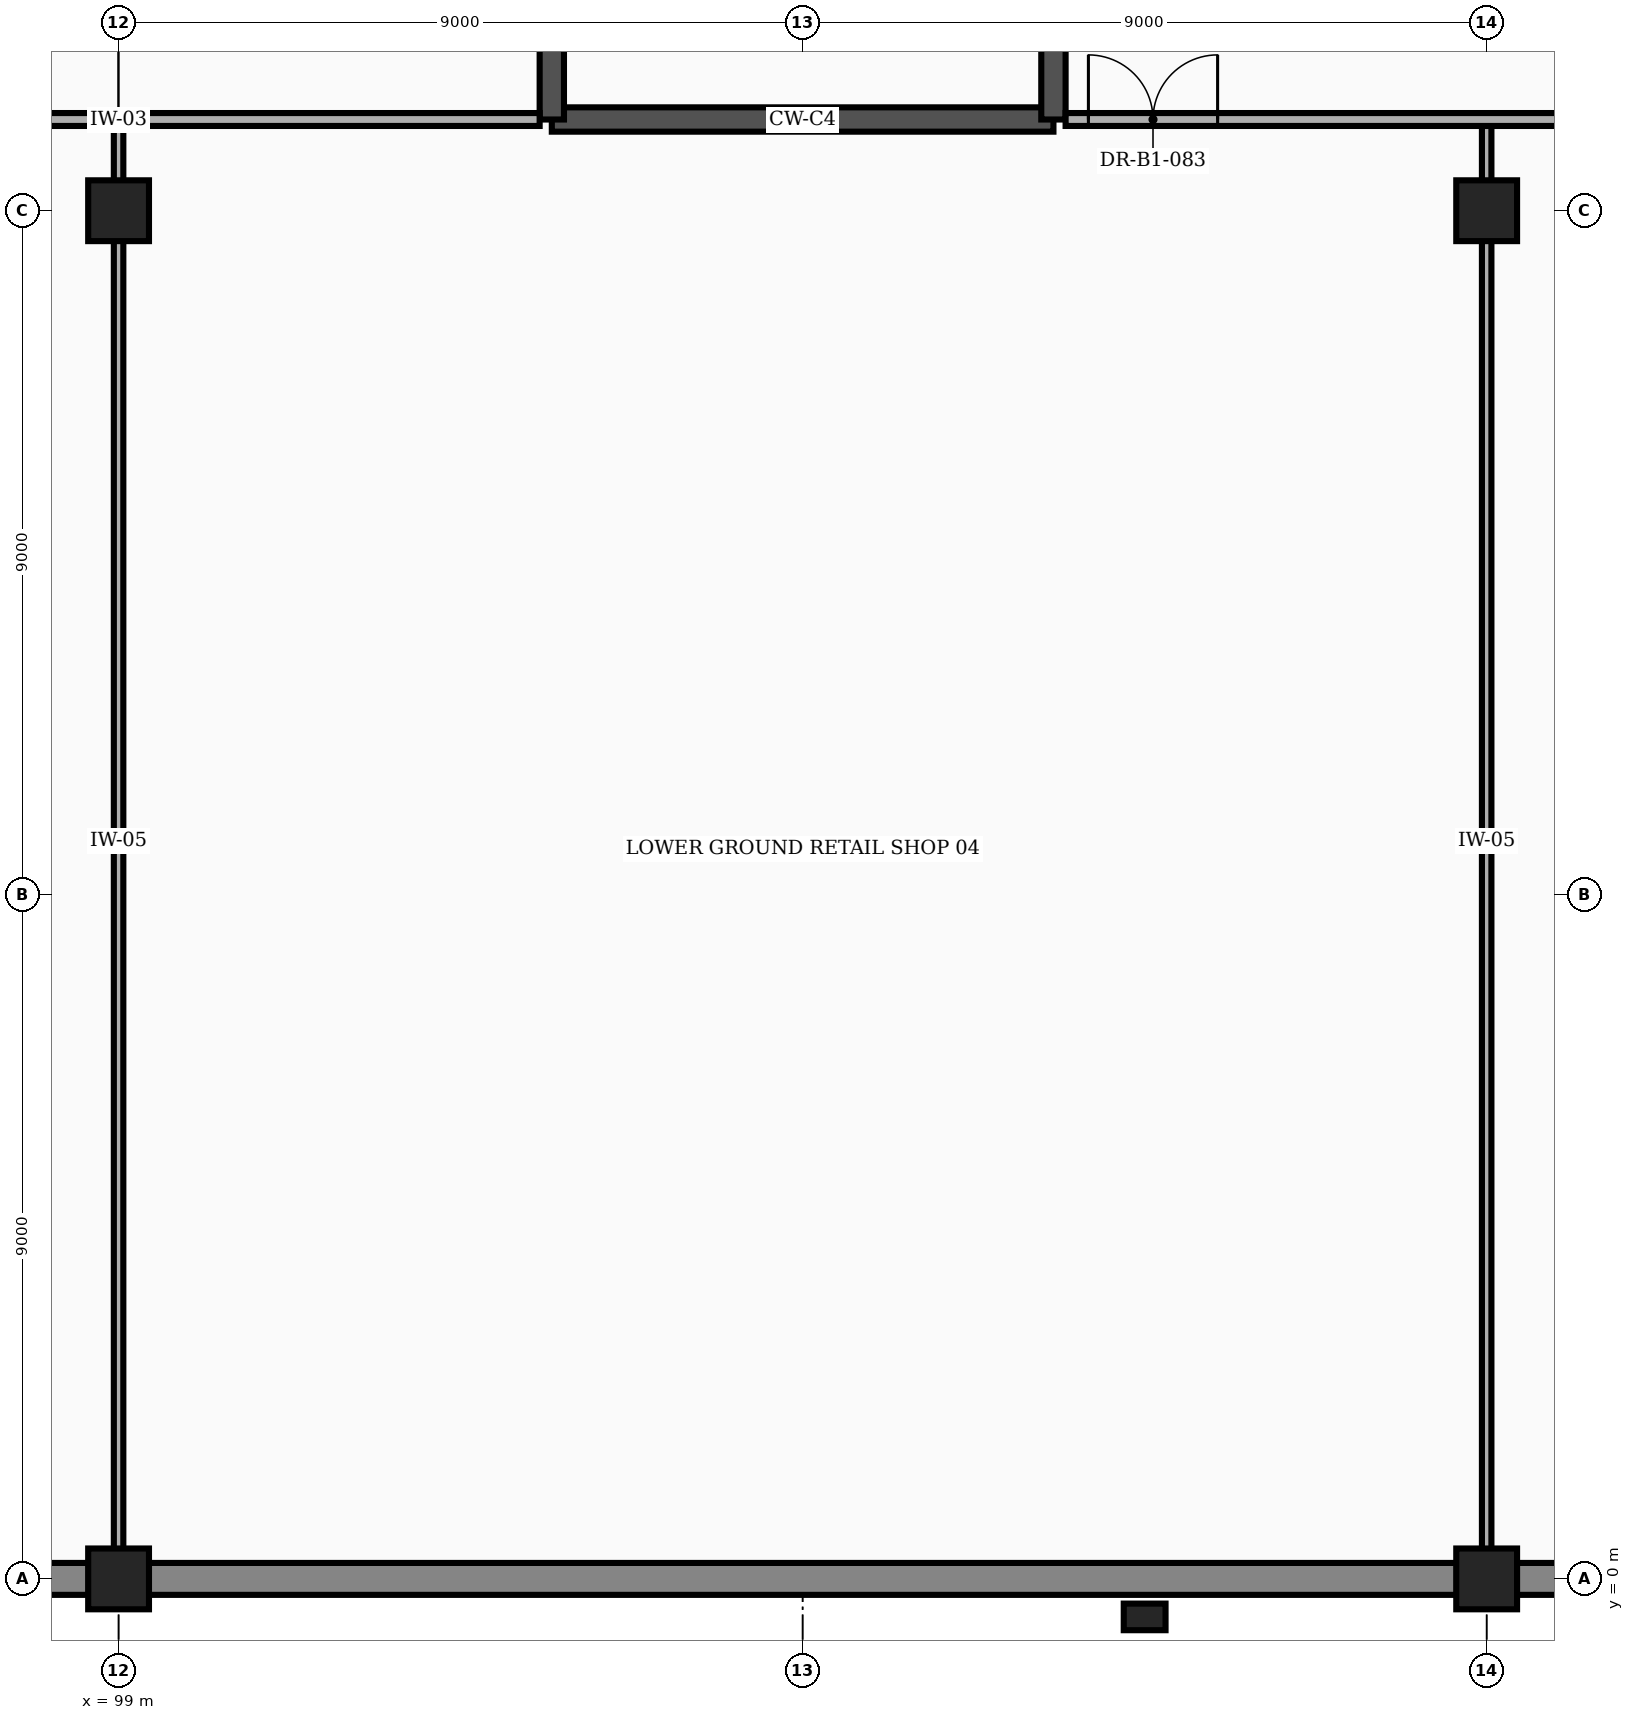
"""IFC4 building model, lengths in metres.
Left out: names, types, materials, properties, quantities, classifications, styles, units other than length and angle.
Written with IfcOpenShell. Run it as: python <this file> out.ifc"""

import sys

from ifc_helpers import new_model, si_unit, direction, frame, frame_2d, origin, origin_2d, place, context, subcontext, project, spatial, rectangle, extrude, element, fill, save


model = new_model("IFC4")
c1 = context("Model", 3, precision=1e-05, world=origin(), true_north=direction((0.0, 1.0)))
c2 = subcontext(c1, "Body", "Model", "MODEL_VIEW")
j1 = project(units=[si_unit("LENGTHUNIT", "METRE"), si_unit("PLANEANGLEUNIT", "RADIAN")], contexts=[c1])
p1 = place(None, origin())
s1 = spatial("IfcSite", under=j1, at=p1, CompositionType="ELEMENT")
p2 = place(p1, origin())
s2 = spatial("IfcBuilding", under=s1, at=p2, CompositionType="ELEMENT")
p3 = place(p2, frame((0.0, 0.0, -4.5)))
s3 = spatial("IfcBuildingStorey", under=s2, at=p3, CompositionType="ELEMENT", Elevation=-4.5)
for number, where, z_axis, x_axis in (
    (1, (99.0, 0.0, -0.45), (0.0, 0.0, 1.0), (1.0, 0.0, 0.0)),
    (2, (99.0, 18.0, -0.45), (0.0, 0.0, 1.0), (1.0, 0.0, 0.0)),
    (3, (117.0, 0.0, -0.45), (0.0, 0.0, 1.0), (1.0, 0.0, 0.0)),
    (4, (117.0, 18.0, -0.45), (0.0, 0.0, 1.0), (1.0, 0.0, 0.0)),
):
    element("IfcColumn", number, at=place(p3, frame(where, z_axis=z_axis, x_axis=x_axis)), inside=s3, PredefinedType="COLUMN", context=c2, shape_type="SweptSolid", body=[
        extrude(rectangle(XDim=0.8, YDim=0.8, at=origin_2d()), origin(), (0.0, 0.0, 1.0), 4.95),
    ])
p4 = place(p3, frame((112.5, -0.5, -0.45), z_axis=(0.0, 0.0, 1.0), x_axis=(1.0, 0.0, 0.0)))
e5 = element("IfcColumn", 5, at=p4, inside=s3, PredefinedType="PILASTER", context=c2, shape_type="SweptSolid", body=[
    extrude(rectangle(XDim=0.55, YDim=0.35, at=origin_2d()), origin(), (0.0, 0.0, 1.0), 4.95),
])
for number, where, z_axis, x_axis in (
    (6, (81.392, 0.0, 0.0), (0.0, 0.0, 1.0), (1.0, 0.0, 0.0)),
    (7, (99.392, 0.0, 0.0), (0.0, 0.0, 1.0), (1.0, 0.0, 0.0)),
    (8, (117.392, 0.0, 0.0), (0.0, 0.0, 1.0), (1.0, 0.0, 0.0)),
):
    element("IfcWall", number, at=place(p3, frame(where, z_axis=z_axis, x_axis=x_axis)), inside=s3, PredefinedType="STANDARD", context=c2, shape_type="SweptSolid", body=[
        extrude(rectangle(XDim=17.216, YDim=0.42, at=frame_2d((8.608, 0.0))), origin(), (0.0, 0.0, 1.0), 3.7),
    ])
p5 = place(p3, frame((104.7, 19.2, 0.0), z_axis=(0.0, 0.0, 1.0), x_axis=(1.0, 0.0, 0.0)))
e9 = element("IfcWall", 9, at=p5, inside=s3, PredefinedType="SHEAR", context=c2, shape_type="SweptSolid", body=[
    extrude(rectangle(XDim=6.6, YDim=0.32, at=frame_2d((3.3, 0.0))), origin(), (0.0, 0.0, 1.0), 4.24),
])
for number, where, z_axis, x_axis in (
    (10, (104.7, 19.2, 0.0), (0.0, 0.0, 1.0), (0.0, 1.0, 0.0)),
    (11, (111.3, 19.2, 0.0), (0.0, 0.0, 1.0), (0.0, 1.0, 0.0)),
):
    element("IfcWall", number, at=place(p3, frame(where, z_axis=z_axis, x_axis=x_axis)), inside=s3, PredefinedType="SHEAR", context=c2, shape_type="SweptSolid", body=[
        extrude(rectangle(XDim=11.0, YDim=0.32, at=frame_2d((5.5, 0.0))), origin(), (0.0, 0.0, 1.0), 4.24),
    ])
for number, where, z_axis, x_axis in (
    (12, (99.0, 0.21, 0.0), (0.0, 0.0, 1.0), (0.0, 1.0, 0.0)),
    (13, (117.0, 0.21, 0.0), (0.0, 0.0, 1.0), (0.0, 1.0, 0.0)),
):
    element("IfcWall", number, at=place(p3, frame(where, z_axis=z_axis, x_axis=x_axis)), inside=s3, PredefinedType="PARTITIONING", context=c2, shape_type="SweptSolid", body=[
        extrude(rectangle(XDim=18.99, YDim=0.125, at=frame_2d((9.495, 0.0))), origin(), (0.0, 0.0, 1.0), 3.628),
    ])
p6 = place(p3, frame((93.46, 19.2, 0.0), z_axis=(0.0, 0.0, 1.0), x_axis=(1.0, 0.0, 0.0)))
e14 = element("IfcWall", 14, at=p6, inside=s3, PredefinedType="PARTITIONING", context=c2, shape_type="SweptSolid", body=[
    extrude(rectangle(XDim=11.08, YDim=0.17, at=frame_2d((5.54, 0.0))), origin(), (0.0, 0.0, 1.0), 4.24),
])
p7 = place(p3, frame((111.46, 19.2, 0.0), z_axis=(0.0, 0.0, 1.0), x_axis=(1.0, 0.0, 0.0)))
e15 = element("IfcWall", 15, at=p7, inside=s3, PredefinedType="PARTITIONING", context=c2, shape_type="SweptSolid", body=[
    extrude(rectangle(XDim=15.74, YDim=0.17, at=frame_2d((7.87, 0.0))), origin(), (0.0, 0.0, 1.0), 4.24),
])
p8 = place(p7, frame((9.6, 0.0, 0.0)))
e16 = element("IfcOpeningElement", 16, at=p8, cuts=e15, PredefinedType="OPENING", context=c2, shape_type="SweptSolid", body=[
    extrude(rectangle(XDim=1.7, YDim=2.3, at=frame_2d((0.85, 1.15))), frame((0.0, 0.097, 0.0), z_axis=(0.0, -1.0, 0.0), x_axis=(1.0, 0.0, 0.0)), (0.0, 0.0, 1.0), 0.194),
])
p9 = place(p7, frame((7.02, 0.0, 0.0)))
e17 = element("IfcOpeningElement", 17, at=p9, cuts=e15, PredefinedType="OPENING", context=c2, shape_type="SweptSolid", body=[
    extrude(rectangle(XDim=1.7, YDim=2.3, at=frame_2d((0.85, 1.15))), frame((0.0, 0.097, 0.0), z_axis=(0.0, -1.0, 0.0), x_axis=(1.0, 0.0, 0.0)), (0.0, 0.0, 1.0), 0.194),
])
p10 = place(p7, frame((0.3, 0.0, 0.0)))
e18 = element("IfcOpeningElement", 18, at=p10, cuts=e15, PredefinedType="OPENING", context=c2, shape_type="SweptSolid", body=[
    extrude(rectangle(XDim=1.7, YDim=2.3, at=frame_2d((0.85, 1.15))), frame((0.0, 0.097, 0.0), z_axis=(0.0, -1.0, 0.0), x_axis=(1.0, 0.0, 0.0)), (0.0, 0.0, 1.0), 0.194),
])
p11 = place(p10, origin())
e19 = element("IfcDoor", 19, at=p11, inside=s3, OperationType="DOUBLE_DOOR_SINGLE_SWING", PredefinedType="DOOR", context=c2, shape_type="SweptSolid", body=[
    extrude(rectangle(XDim=1.7, YDim=2.3, at=frame_2d((0.85, 1.15))), frame((0.0, 0.025, 0.0), z_axis=(0.0, -1.0, 0.0), x_axis=(1.0, 0.0, 0.0)), (0.0, 0.0, 1.0), 0.05),
])
fill(e18, e19)
save(model, sys.argv[1])
